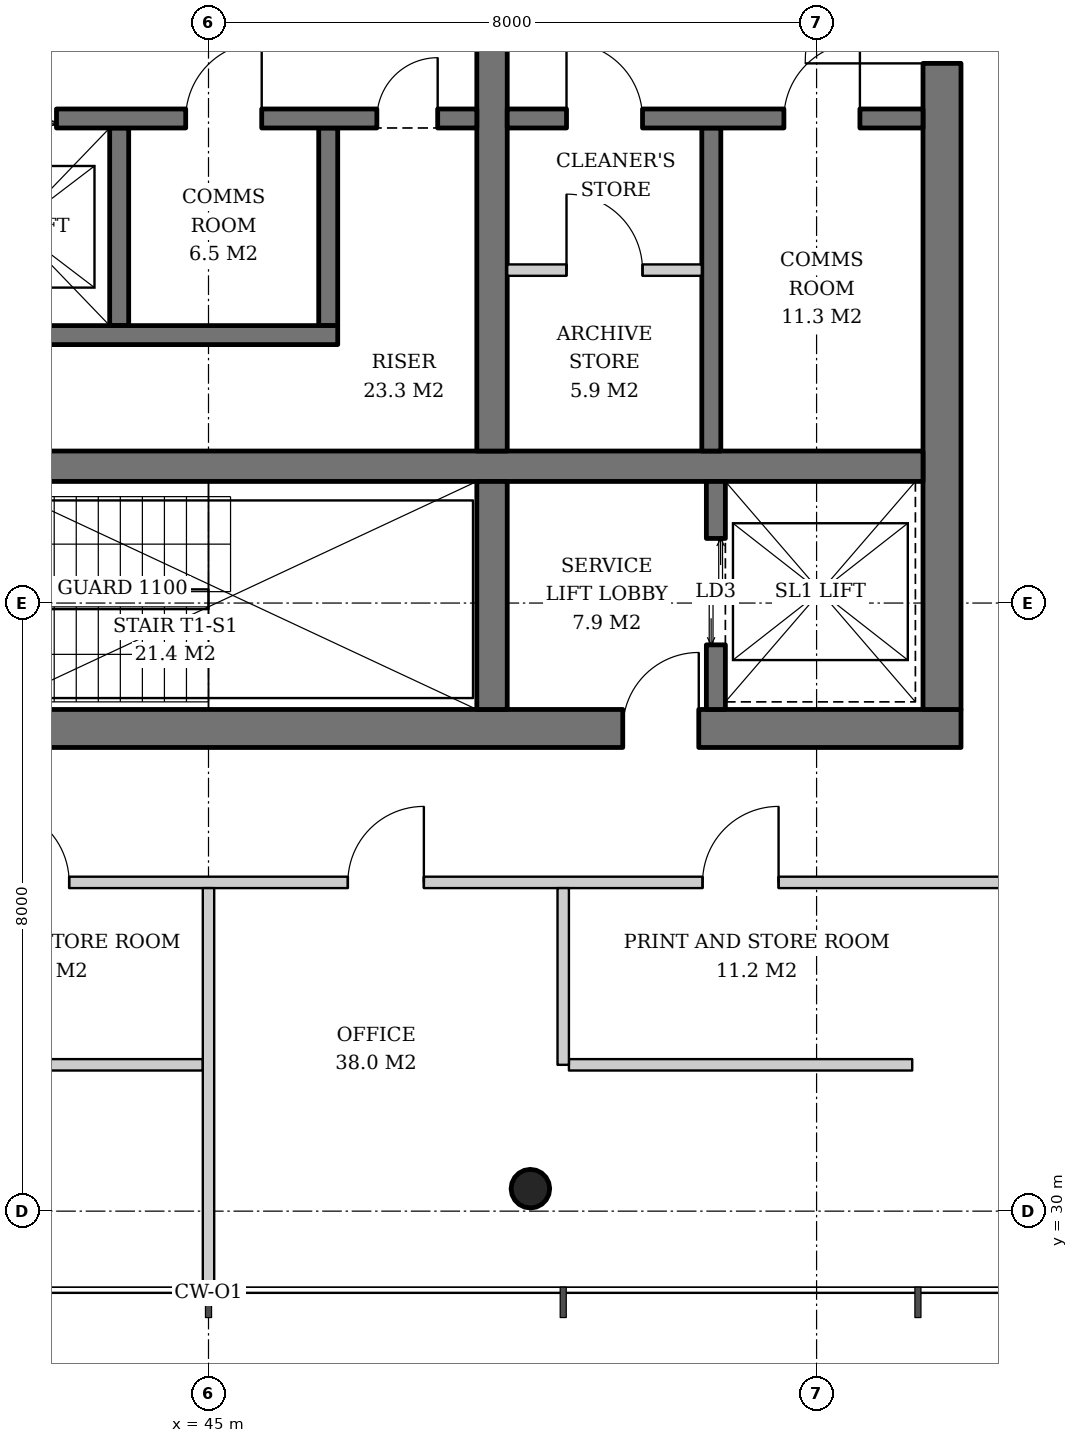
"""IFC4 building model, lengths in metres.
Left out: names, types, materials, properties, quantities, classifications, styles, units other than length and angle.
Written with IfcOpenShell. Run it as: python <this file> out.ifc"""

import sys

from ifc_helpers import new_model, si_unit, direction, frame, frame_2d, origin, origin_2d, place, context, subcontext, project, spatial, rectangle, hollow_circle, extrude, element, fill, save


model = new_model("IFC4")
c1 = context("Model", 3, precision=1e-05, world=origin(), true_north=direction((0.0, 1.0)))
c2 = subcontext(c1, "Body", "Model", "MODEL_VIEW")
j1 = project(units=[si_unit("LENGTHUNIT", "METRE"), si_unit("PLANEANGLEUNIT", "RADIAN")], contexts=[c1])
p1 = place(None, origin())
s1 = spatial("IfcSite", under=j1, at=p1, CompositionType="ELEMENT")
p2 = place(p1, origin())
s2 = spatial("IfcBuilding", under=s1, at=p2, CompositionType="ELEMENT")
p3 = place(p2, frame((0.0, 0.0, 279.4)))
s3 = spatial("IfcBuildingStorey", under=s2, at=p3, CompositionType="ELEMENT", Elevation=279.4)
p4 = place(p3, frame((49.248, 30.257, 0.0), z_axis=(-0.010658893366, 0.031976680097, 0.999431778523), x_axis=(-0.948683298051, -0.316227766017, 0.0)))
e1 = element("IfcColumn", 1, at=p4, inside=s3, PredefinedType="COLUMN", context=c2, shape_type="SweptSolid", body=[
    extrude(hollow_circle(Radius=0.254, WallThickness=0.02, at=origin_2d()), origin(), (0.0, 0.0, 1.0), 3.802),
])
p5 = place(p3, frame((35.1, 36.35, 0.0), z_axis=(0.0, 0.0, 1.0), x_axis=(1.0, 0.0, 0.0)))
e2 = element("IfcWall", 2, at=p5, inside=s3, PredefinedType="SHEAR", context=c2, shape_type="SweptSolid", body=[
    extrude(rectangle(XDim=19.8, YDim=0.5, at=frame_2d((9.9, 0.0))), origin(), (0.0, 0.0, 1.0), 3.8),
])
p6 = place(p5, frame((3.9, 0.0, 0.0)))
e3 = element("IfcOpeningElement", 3, at=p6, cuts=e2, PredefinedType="OPENING", context=c2, shape_type="SweptSolid", body=[
    extrude(rectangle(XDim=1.0, YDim=2.1, at=frame_2d((0.5, 1.05))), frame((0.0, 0.26, 0.0), z_axis=(0.0, -1.0, 0.0), x_axis=(1.0, 0.0, 0.0)), (0.0, 0.0, 1.0), 0.52),
])
p7 = place(p5, frame((15.35, 0.0, 0.0)))
e4 = element("IfcOpeningElement", 4, at=p7, cuts=e2, PredefinedType="OPENING", context=c2, shape_type="SweptSolid", body=[
    extrude(rectangle(XDim=1.0, YDim=2.1, at=frame_2d((0.5, 1.05))), frame((0.0, 0.26, 0.0), z_axis=(0.0, -1.0, 0.0), x_axis=(1.0, 0.0, 0.0)), (0.0, 0.0, 1.0), 0.52),
])
p8 = place(p3, frame((54.65, 36.6, 0.0), z_axis=(0.0, 0.0, 1.0), x_axis=(0.0, 1.0, 0.0)))
e5 = element("IfcWall", 5, at=p8, inside=s3, PredefinedType="SHEAR", context=c2, shape_type="SweptSolid", body=[
    extrude(rectangle(XDim=18.8, YDim=0.5, at=frame_2d((9.4, 0.0))), origin(), (0.0, 0.0, 1.0), 3.8),
])
p9 = place(p8, frame((8.5, 0.0, 0.0)))
e6 = element("IfcOpeningElement", 6, at=p9, cuts=e5, PredefinedType="OPENING", context=c2, shape_type="SweptSolid", body=[
    extrude(rectangle(XDim=1.8, YDim=2.4, at=frame_2d((0.9, 1.2))), frame((0.0, 0.26, 0.0), z_axis=(0.0, -1.0, 0.0), x_axis=(1.0, 0.0, 0.0)), (0.0, 0.0, 1.0), 0.52),
])
p10 = place(p3, frame((35.6, 39.8, 0.0), z_axis=(0.0, 0.0, 1.0), x_axis=(1.0, 0.0, 0.0)))
e7 = element("IfcWall", 7, at=p10, inside=s3, PredefinedType="SHEAR", context=c2, shape_type="SweptSolid", body=[
    extrude(rectangle(XDim=18.8, YDim=0.4, at=frame_2d((9.4, 0.0))), origin(), (0.0, 0.0, 1.0), 3.8),
])
p11 = place(p3, frame((48.73, 36.6, 0.0), z_axis=(0.0, 0.0, 1.0), x_axis=(0.0, 1.0, 0.0)))
e8 = element("IfcWall", 8, at=p11, inside=s3, PredefinedType="SHEAR", context=c2, shape_type="SweptSolid", body=[
    extrude(rectangle(XDim=3.0, YDim=0.4, at=frame_2d((1.5, 0.0))), origin(), (0.0, 0.0, 1.0), 3.8),
])
p12 = place(p3, frame((48.73, 40.0, 0.0), z_axis=(0.0, 0.0, 1.0), x_axis=(0.0, 1.0, 0.0)))
e9 = element("IfcWall", 9, at=p12, inside=s3, PredefinedType="SHEAR", context=c2, shape_type="SweptSolid", body=[
    extrude(rectangle(XDim=12.0, YDim=0.4, at=frame_2d((6.0, 0.0))), origin(), (0.0, 0.0, 1.0), 3.8),
])
p13 = place(p3, frame((51.675, 36.6, 0.0), z_axis=(0.0, 0.0, 1.0), x_axis=(0.0, 1.0, 0.0)))
e10 = element("IfcWall", 10, at=p13, inside=s3, PredefinedType="SHEAR", context=c2, shape_type="SweptSolid", body=[
    extrude(rectangle(XDim=3.0, YDim=0.25, at=frame_2d((1.5, 0.0))), origin(), (0.0, 0.0, 1.0), 3.8),
])
p14 = place(p13, frame((0.85, 0.0, 0.0)))
e11 = element("IfcOpeningElement", 11, at=p14, cuts=e10, PredefinedType="OPENING", context=c2, shape_type="SweptSolid", body=[
    extrude(rectangle(XDim=1.4, YDim=2.4, at=frame_2d((0.7, 1.2))), frame((0.0, 0.135, 0.0), z_axis=(0.0, -1.0, 0.0), x_axis=(1.0, 0.0, 0.0)), (0.0, 0.0, 1.0), 0.27),
])
for number, where, z_axis, x_axis in (
    (12, (43.825, 44.25, 0.0), (0.0, 0.0, 1.0), (0.0, -1.0, 0.0)),
    (13, (46.575, 44.25, 0.0), (0.0, 0.0, 1.0), (0.0, -1.0, 0.0)),
):
    element("IfcWall", number, at=place(p3, frame(where, z_axis=z_axis, x_axis=x_axis)), inside=s3, PredefinedType="SHEAR", context=c2, shape_type="SweptSolid", body=[
        extrude(rectangle(XDim=2.6, YDim=0.25, at=frame_2d((1.3, 0.0))), origin(), (0.0, 0.0, 1.0), 3.8),
    ])
p15 = place(p3, frame((35.6, 41.525, 0.0), z_axis=(0.0, 0.0, 1.0), x_axis=(1.0, 0.0, 0.0)))
e14 = element("IfcWall", 14, at=p15, inside=s3, PredefinedType="SHEAR", context=c2, shape_type="SweptSolid", body=[
    extrude(rectangle(XDim=11.1, YDim=0.25, at=frame_2d((5.55, 0.0))), origin(), (0.0, 0.0, 1.0), 3.8),
])
p16 = place(p3, frame((35.6, 44.375, 0.0), z_axis=(0.0, 0.0, 1.0), x_axis=(1.0, 0.0, 0.0)))
e15 = element("IfcWall", 15, at=p16, inside=s3, PredefinedType="SHEAR", context=c2, shape_type="SweptSolid", body=[
    extrude(rectangle(XDim=12.93, YDim=0.25, at=frame_2d((6.465, 0.0))), origin(), (0.0, 0.0, 1.0), 3.8),
])
p17 = place(p16, frame((0.75, 0.0, 0.0)))
e16 = element("IfcOpeningElement", 16, at=p17, cuts=e15, PredefinedType="OPENING", context=c2, shape_type="SweptSolid", body=[
    extrude(rectangle(XDim=1.1, YDim=2.2, at=frame_2d((0.55, 1.1))), frame((0.0, 0.135, 0.0), z_axis=(0.0, -1.0, 0.0), x_axis=(1.0, 0.0, 0.0)), (0.0, 0.0, 1.0), 0.27),
])
p18 = place(p16, frame((3.55, 0.0, 0.0)))
e17 = element("IfcOpeningElement", 17, at=p18, cuts=e15, PredefinedType="OPENING", context=c2, shape_type="SweptSolid", body=[
    extrude(rectangle(XDim=1.1, YDim=2.2, at=frame_2d((0.55, 1.1))), frame((0.0, 0.135, 0.0), z_axis=(0.0, -1.0, 0.0), x_axis=(1.0, 0.0, 0.0)), (0.0, 0.0, 1.0), 0.27),
])
p19 = place(p16, frame((6.3, 0.0, 0.0)))
e18 = element("IfcOpeningElement", 18, at=p19, cuts=e15, PredefinedType="OPENING", context=c2, shape_type="SweptSolid", body=[
    extrude(rectangle(XDim=1.1, YDim=2.2, at=frame_2d((0.55, 1.1))), frame((0.0, 0.135, 0.0), z_axis=(0.0, -1.0, 0.0), x_axis=(1.0, 0.0, 0.0)), (0.0, 0.0, 1.0), 0.27),
])
p20 = place(p16, frame((9.1, 0.0, 0.0)))
e19 = element("IfcOpeningElement", 19, at=p20, cuts=e15, PredefinedType="OPENING", context=c2, shape_type="SweptSolid", body=[
    extrude(rectangle(XDim=1.0, YDim=2.1, at=frame_2d((0.5, 1.05))), frame((0.0, 0.135, 0.0), z_axis=(0.0, -1.0, 0.0), x_axis=(1.0, 0.0, 0.0)), (0.0, 0.0, 1.0), 0.27),
])
p21 = place(p16, frame((11.615, 0.0, 0.0)))
e20 = element("IfcOpeningElement", 20, at=p21, cuts=e15, PredefinedType="OPENING", context=c2, shape_type="SweptSolid", body=[
    extrude(rectangle(XDim=0.8, YDim=2.0, at=frame_2d((0.4, 1.0))), frame((0.0, 0.135, 0.0), z_axis=(0.0, -1.0, 0.0), x_axis=(1.0, 0.0, 0.0)), (0.0, 0.0, 1.0), 0.27),
])
p22 = place(p3, frame((51.615, 44.25, 0.0), z_axis=(0.0, 0.0, 1.0), x_axis=(0.0, -1.0, 0.0)))
e21 = element("IfcWall", 21, at=p22, inside=s3, PredefinedType="SHEAR", context=c2, shape_type="SweptSolid", body=[
    extrude(rectangle(XDim=4.25, YDim=0.25, at=frame_2d((2.125, 0.0))), origin(), (0.0, 0.0, 1.0), 3.8),
])
p23 = place(p3, frame((48.93, 44.375, 0.0), z_axis=(0.0, 0.0, 1.0), x_axis=(1.0, 0.0, 0.0)))
e22 = element("IfcWall", 22, at=p23, inside=s3, PredefinedType="SHEAR", context=c2, shape_type="SweptSolid", body=[
    extrude(rectangle(XDim=5.47, YDim=0.25, at=frame_2d((2.735, 0.0))), origin(), (0.0, 0.0, 1.0), 3.8),
])
p24 = place(p23, frame((0.78, 0.0, 0.0)))
e23 = element("IfcOpeningElement", 23, at=p24, cuts=e22, PredefinedType="OPENING", context=c2, shape_type="SweptSolid", body=[
    extrude(rectangle(XDim=1.0, YDim=2.1, at=frame_2d((0.5, 1.05))), frame((0.0, 0.135, 0.0), z_axis=(0.0, -1.0, 0.0), x_axis=(1.0, 0.0, 0.0)), (0.0, 0.0, 1.0), 0.27),
])
p25 = place(p23, frame((3.64, 0.0, 0.0)))
e24 = element("IfcOpeningElement", 24, at=p25, cuts=e22, PredefinedType="OPENING", context=c2, shape_type="SweptSolid", body=[
    extrude(rectangle(XDim=1.0, YDim=2.1, at=frame_2d((0.5, 1.05))), frame((0.0, 0.135, 0.0), z_axis=(0.0, -1.0, 0.0), x_axis=(1.0, 0.0, 0.0)), (0.0, 0.0, 1.0), 0.27),
])
p26 = place(p3, frame((48.93, 42.38, 0.0), z_axis=(0.0, 0.0, 1.0), x_axis=(1.0, 0.0, 0.0)))
e25 = element("IfcWall", 25, at=p26, inside=s3, PredefinedType="SOLIDWALL", context=c2, shape_type="SweptSolid", body=[
    extrude(rectangle(XDim=2.56, YDim=0.15, at=frame_2d((1.28, 0.0))), origin(), (0.0, 0.0, 1.0), 3.5),
])
p27 = place(p26, frame((0.78, 0.0, 0.0)))
e26 = element("IfcOpeningElement", 26, at=p27, cuts=e25, PredefinedType="OPENING", context=c2, shape_type="SweptSolid", body=[
    extrude(rectangle(XDim=1.0, YDim=2.1, at=frame_2d((0.5, 1.05))), frame((0.0, 0.085, 0.0), z_axis=(0.0, -1.0, 0.0), x_axis=(1.0, 0.0, 0.0)), (0.0, 0.0, 1.0), 0.17),
])
for number, where, z_axis, x_axis in (
    (27, (40.408, 31.925, 0.0), (0.0, 0.0, 1.0), (1.0, 0.0, 0.0)),
    (28, (49.742, 31.925, 0.0), (0.0, 0.0, 1.0), (1.0, 0.0, 0.0)),
):
    element("IfcWall", number, at=place(p3, frame(where, z_axis=z_axis, x_axis=x_axis)), inside=s3, PredefinedType="PARTITIONING", context=c2, shape_type="SweptSolid", body=[
        extrude(rectangle(XDim=4.517, YDim=0.15, at=frame_2d((2.258, 0.0))), origin(), (0.0, 0.0, 1.0), 2.747),
    ])
p28 = place(p3, frame((34.249, 34.325, 0.0), z_axis=(0.0, 0.0, 1.0), x_axis=(1.0, 0.0, 0.0)))
e29 = element("IfcWall", 29, at=p28, inside=s3, PredefinedType="PARTITIONING", context=c2, shape_type="SweptSolid", body=[
    extrude(rectangle(XDim=21.503, YDim=0.15, at=frame_2d((10.751, 0.0))), origin(), (0.0, 0.0, 1.0), 2.747),
])
p29 = place(p28, frame((3.251, 0.0, 0.0)))
e30 = element("IfcOpeningElement", 30, at=p29, cuts=e29, PredefinedType="OPENING", context=c2, shape_type="SweptSolid", body=[
    extrude(rectangle(XDim=1.0, YDim=2.1, at=frame_2d((0.5, 1.05))), frame((0.0, 0.085, 0.0), z_axis=(0.0, -1.0, 0.0), x_axis=(1.0, 0.0, 0.0)), (0.0, 0.0, 1.0), 0.17),
])
p30 = place(p28, frame((7.918, 0.0, 0.0)))
e31 = element("IfcOpeningElement", 31, at=p30, cuts=e29, PredefinedType="OPENING", context=c2, shape_type="SweptSolid", body=[
    extrude(rectangle(XDim=1.0, YDim=2.1, at=frame_2d((0.5, 1.05))), frame((0.0, 0.085, 0.0), z_axis=(0.0, -1.0, 0.0), x_axis=(1.0, 0.0, 0.0)), (0.0, 0.0, 1.0), 0.17),
])
p31 = place(p28, frame((12.585, 0.0, 0.0)))
e32 = element("IfcOpeningElement", 32, at=p31, cuts=e29, PredefinedType="OPENING", context=c2, shape_type="SweptSolid", body=[
    extrude(rectangle(XDim=1.0, YDim=2.1, at=frame_2d((0.5, 1.05))), frame((0.0, 0.085, 0.0), z_axis=(0.0, -1.0, 0.0), x_axis=(1.0, 0.0, 0.0)), (0.0, 0.0, 1.0), 0.17),
])
p32 = place(p28, frame((17.251, 0.0, 0.0)))
e33 = element("IfcOpeningElement", 33, at=p32, cuts=e29, PredefinedType="OPENING", context=c2, shape_type="SweptSolid", body=[
    extrude(rectangle(XDim=1.0, YDim=2.1, at=frame_2d((0.5, 1.05))), frame((0.0, 0.085, 0.0), z_axis=(0.0, -1.0, 0.0), x_axis=(1.0, 0.0, 0.0)), (0.0, 0.0, 1.0), 0.17),
])
p33 = place(p3, frame((45.0, 34.25, 0.0), z_axis=(0.0, 0.0, 1.0), x_axis=(0.0, -1.0, 0.0)))
e34 = element("IfcWall", 34, at=p33, inside=s3, PredefinedType="PARTITIONING", context=c2, shape_type="SweptSolid", body=[
    extrude(rectangle(XDim=5.29, YDim=0.15, at=frame_2d((2.645, 0.0))), origin(), (0.0, 0.0, 1.0), 3.0),
])
p34 = place(p3, frame((49.667, 34.25, 0.0), z_axis=(0.0, 0.0, 1.0), x_axis=(0.0, -1.0, 0.0)))
e35 = element("IfcWall", 35, at=p34, inside=s3, PredefinedType="PARTITIONING", context=c2, shape_type="SweptSolid", body=[
    extrude(rectangle(XDim=2.325, YDim=0.15, at=frame_2d((1.163, 0.0))), origin(), (0.0, 0.0, 1.0), 3.5),
])
p35 = place(p14, origin())
e36 = element("IfcDoor", 36, at=p35, inside=s3, OperationType="DOUBLE_DOOR_SLIDING", PredefinedType="DOOR", context=c2, shape_type="SweptSolid", body=[
    extrude(rectangle(XDim=1.4, YDim=2.4, at=frame_2d((0.7, 1.2))), frame((0.0, 0.025, 0.0), z_axis=(0.0, -1.0, 0.0), x_axis=(1.0, 0.0, 0.0)), (0.0, 0.0, 1.0), 0.05),
])
fill(e11, e36)
p36 = place(p19, origin())
e37 = element("IfcDoor", 37, at=p36, inside=s3, OperationType="DOUBLE_DOOR_SLIDING", PredefinedType="DOOR", context=c2, shape_type="SweptSolid", body=[
    extrude(rectangle(XDim=1.1, YDim=2.2, at=frame_2d((0.55, 1.1))), frame((0.0, 0.025, 0.0), z_axis=(0.0, -1.0, 0.0), x_axis=(1.0, 0.0, 0.0)), (0.0, 0.0, 1.0), 0.05),
])
fill(e18, e37)
p37 = place(p20, origin())
e38 = element("IfcDoor", 38, at=p37, inside=s3, OperationType="SINGLE_SWING_RIGHT", PredefinedType="DOOR", context=c2, shape_type="SweptSolid", body=[
    extrude(rectangle(XDim=1.0, YDim=2.1, at=frame_2d((0.5, 1.05))), frame((0.0, 0.025, 0.0), z_axis=(0.0, -1.0, 0.0), x_axis=(1.0, 0.0, 0.0)), (0.0, 0.0, 1.0), 0.05),
])
fill(e19, e38)
p38 = place(p21, origin())
e39 = element("IfcDoor", 39, at=p38, inside=s3, OperationType="SINGLE_SWING_RIGHT", PredefinedType="DOOR", context=c2, shape_type="SweptSolid", body=[
    extrude(rectangle(XDim=0.8, YDim=2.0, at=frame_2d((0.4, 1.0))), frame((0.0, 0.025, 0.0), z_axis=(0.0, -1.0, 0.0), x_axis=(1.0, 0.0, 0.0)), (0.0, 0.0, 1.0), 0.05),
])
fill(e20, e39)
p39 = place(p24, origin())
e40 = element("IfcDoor", 40, at=p39, inside=s3, OperationType="SINGLE_SWING_LEFT", PredefinedType="DOOR", context=c2, shape_type="SweptSolid", body=[
    extrude(rectangle(XDim=1.0, YDim=2.1, at=frame_2d((0.5, 1.05))), frame((0.0, 0.025, 0.0), z_axis=(0.0, -1.0, 0.0), x_axis=(1.0, 0.0, 0.0)), (0.0, 0.0, 1.0), 0.05),
])
fill(e23, e40)
p40 = place(p25, origin())
e41 = element("IfcDoor", 41, at=p40, inside=s3, OperationType="SINGLE_SWING_RIGHT", PredefinedType="DOOR", context=c2, shape_type="SweptSolid", body=[
    extrude(rectangle(XDim=1.0, YDim=2.1, at=frame_2d((0.5, 1.05))), frame((0.0, 0.025, 0.0), z_axis=(0.0, -1.0, 0.0), x_axis=(1.0, 0.0, 0.0)), (0.0, 0.0, 1.0), 0.05),
])
fill(e24, e41)
p41 = place(p27, origin())
e42 = element("IfcDoor", 42, at=p41, inside=s3, OperationType="SINGLE_SWING_LEFT", PredefinedType="DOOR", context=c2, shape_type="SweptSolid", body=[
    extrude(rectangle(XDim=1.0, YDim=2.1, at=frame_2d((0.5, 1.05))), frame((0.0, 0.025, 0.0), z_axis=(0.0, -1.0, 0.0), x_axis=(1.0, 0.0, 0.0)), (0.0, 0.0, 1.0), 0.05),
])
fill(e26, e42)
p42 = place(p9, origin())
e43 = element("IfcDoor", 43, at=p42, inside=s3, OperationType="DOUBLE_DOOR_SINGLE_SWING", PredefinedType="DOOR", context=c2, shape_type="SweptSolid", body=[
    extrude(rectangle(XDim=1.8, YDim=2.4, at=frame_2d((0.9, 1.2))), frame((0.0, 0.025, 0.0), z_axis=(0.0, -1.0, 0.0), x_axis=(1.0, 0.0, 0.0)), (0.0, 0.0, 1.0), 0.05),
])
fill(e6, e43)
p43 = place(p7, origin())
e44 = element("IfcDoor", 44, at=p43, inside=s3, OperationType="SINGLE_SWING_RIGHT", PredefinedType="DOOR", context=c2, shape_type="SweptSolid", body=[
    extrude(rectangle(XDim=1.0, YDim=2.1, at=frame_2d((0.5, 1.05))), frame((0.0, 0.025, 0.0), z_axis=(0.0, -1.0, 0.0), x_axis=(1.0, 0.0, 0.0)), (0.0, 0.0, 1.0), 0.05),
])
fill(e4, e44)
p44 = place(p30, origin())
e45 = element("IfcDoor", 45, at=p44, inside=s3, OperationType="SINGLE_SWING_LEFT", PredefinedType="DOOR", context=c2, shape_type="SweptSolid", body=[
    extrude(rectangle(XDim=1.0, YDim=2.1, at=frame_2d((0.5, 1.05))), frame((0.0, 0.025, 0.0), z_axis=(0.0, -1.0, 0.0), x_axis=(1.0, 0.0, 0.0)), (0.0, 0.0, 1.0), 0.05),
])
fill(e31, e45)
p45 = place(p31, origin())
e46 = element("IfcDoor", 46, at=p45, inside=s3, OperationType="SINGLE_SWING_RIGHT", PredefinedType="DOOR", context=c2, shape_type="SweptSolid", body=[
    extrude(rectangle(XDim=1.0, YDim=2.1, at=frame_2d((0.5, 1.05))), frame((0.0, 0.025, 0.0), z_axis=(0.0, -1.0, 0.0), x_axis=(1.0, 0.0, 0.0)), (0.0, 0.0, 1.0), 0.05),
])
fill(e32, e46)
p46 = place(p32, origin())
e47 = element("IfcDoor", 47, at=p46, inside=s3, OperationType="SINGLE_SWING_RIGHT", PredefinedType="DOOR", context=c2, shape_type="SweptSolid", body=[
    extrude(rectangle(XDim=1.0, YDim=2.1, at=frame_2d((0.5, 1.05))), frame((0.0, 0.025, 0.0), z_axis=(0.0, -1.0, 0.0), x_axis=(1.0, 0.0, 0.0)), (0.0, 0.0, 1.0), 0.05),
])
fill(e33, e47)
save(model, sys.argv[1])
